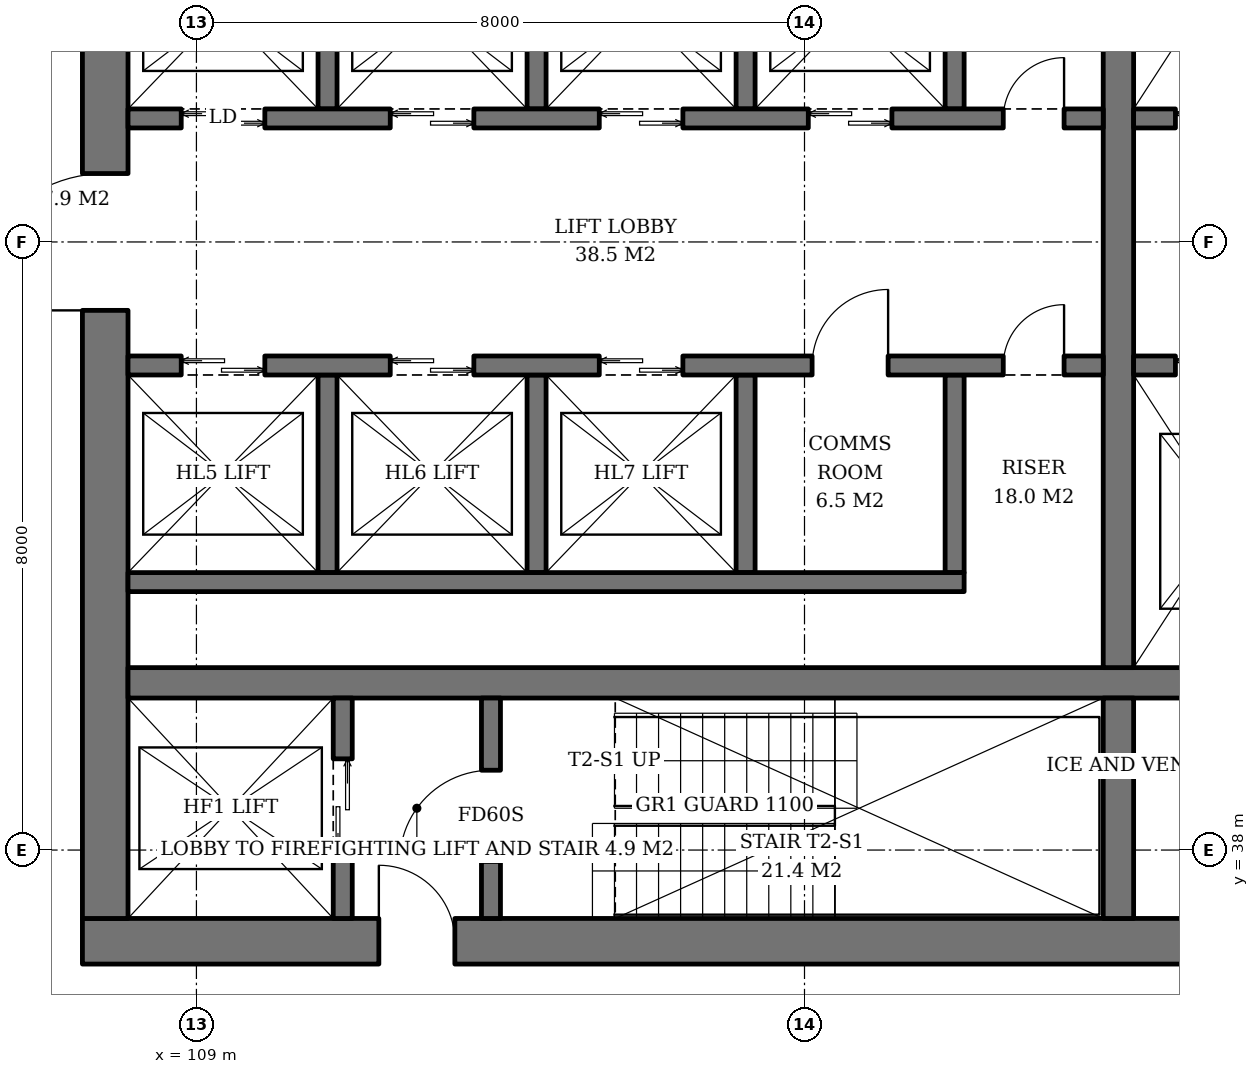
"""IFC4 building model, lengths in metres.
Left out: names, types, materials, properties, quantities, classifications, styles, units other than length and angle.
Written with IfcOpenShell. Run it as: python <this file> out.ifc"""

import sys

from ifc_helpers import new_model, si_unit, direction, frame, frame_2d, origin, place, context, subcontext, project, spatial, rectangle, extrude, element, fill, save


model = new_model("IFC4")
c1 = context("Model", 3, precision=1e-05, world=origin(), true_north=direction((0.0, 1.0)))
c2 = subcontext(c1, "Body", "Model", "MODEL_VIEW")
j1 = project(units=[si_unit("LENGTHUNIT", "METRE"), si_unit("PLANEANGLEUNIT", "RADIAN")], contexts=[c1])
p1 = place(None, origin())
s1 = spatial("IfcSite", under=j1, at=p1, CompositionType="ELEMENT")
p2 = place(p1, origin())
s2 = spatial("IfcBuilding", under=s1, at=p2, CompositionType="ELEMENT")
p3 = place(p2, frame((0.0, 0.0, 127.4)))
s3 = spatial("IfcBuildingStorey", under=s2, at=p3, CompositionType="ELEMENT", Elevation=127.4)
p4 = place(p3, frame((107.5, 36.8, 0.0), z_axis=(0.0, 0.0, 1.0), x_axis=(1.0, 0.0, 0.0)))
e1 = element("IfcWall", 1, at=p4, inside=s3, PredefinedType="SHEAR", context=c2, shape_type="SweptSolid", body=[
    extrude(rectangle(XDim=19.0, YDim=0.6, at=frame_2d((9.5, 0.0))), origin(), (0.0, 0.0, 1.0), 3.8),
])
p5 = place(p4, frame((3.9, 0.0, 0.0)))
e2 = element("IfcOpeningElement", 2, at=p5, cuts=e1, PredefinedType="OPENING", context=c2, shape_type="SweptSolid", body=[
    extrude(rectangle(XDim=1.0, YDim=2.1, at=frame_2d((0.5, 1.05))), frame((0.0, 0.31, 0.0), z_axis=(0.0, -1.0, 0.0), x_axis=(1.0, 0.0, 0.0)), (0.0, 0.0, 1.0), 0.62),
])
p6 = place(p4, frame((14.472, 0.0, 0.0)))
e3 = element("IfcOpeningElement", 3, at=p6, cuts=e1, PredefinedType="OPENING", context=c2, shape_type="SweptSolid", body=[
    extrude(rectangle(XDim=1.0, YDim=2.1, at=frame_2d((0.5, 1.05))), frame((0.0, 0.31, 0.0), z_axis=(0.0, -1.0, 0.0), x_axis=(1.0, 0.0, 0.0)), (0.0, 0.0, 1.0), 0.62),
])
p7 = place(p4, frame((16.365, 0.0, 0.0)))
e4 = element("IfcOpeningElement", 4, at=p7, cuts=e1, PredefinedType="OPENING", context=c2, shape_type="SweptSolid", body=[
    extrude(rectangle(XDim=1.0, YDim=2.1, at=frame_2d((0.5, 1.05))), frame((0.0, 0.31, 0.0), z_axis=(0.0, -1.0, 0.0), x_axis=(1.0, 0.0, 0.0)), (0.0, 0.0, 1.0), 0.62),
])
p8 = place(p3, frame((107.8, 37.1, 0.0), z_axis=(0.0, 0.0, 1.0), x_axis=(0.0, 1.0, 0.0)))
e5 = element("IfcWall", 5, at=p8, inside=s3, PredefinedType="SHEAR", context=c2, shape_type="SweptSolid", body=[
    extrude(rectangle(XDim=17.8, YDim=0.6, at=frame_2d((8.9, 0.0))), origin(), (0.0, 0.0, 1.0), 3.8),
])
p9 = place(p8, frame((8.0, 0.0, 0.0)))
e6 = element("IfcOpeningElement", 6, at=p9, cuts=e5, PredefinedType="OPENING", context=c2, shape_type="SweptSolid", body=[
    extrude(rectangle(XDim=1.8, YDim=2.4, at=frame_2d((0.9, 1.2))), frame((0.0, 0.31, 0.0), z_axis=(0.0, -1.0, 0.0), x_axis=(1.0, 0.0, 0.0)), (0.0, 0.0, 1.0), 0.62),
])
p10 = place(p3, frame((108.1, 40.2, 0.0), z_axis=(0.0, 0.0, 1.0), x_axis=(1.0, 0.0, 0.0)))
e7 = element("IfcWall", 7, at=p10, inside=s3, PredefinedType="SHEAR", context=c2, shape_type="SweptSolid", body=[
    extrude(rectangle(XDim=17.8, YDim=0.4, at=frame_2d((8.9, 0.0))), origin(), (0.0, 0.0, 1.0), 3.8),
])
p11 = place(p3, frame((121.13, 37.1, 0.0), z_axis=(0.0, 0.0, 1.0), x_axis=(0.0, 1.0, 0.0)))
e8 = element("IfcWall", 8, at=p11, inside=s3, PredefinedType="SHEAR", context=c2, shape_type="SweptSolid", body=[
    extrude(rectangle(XDim=2.9, YDim=0.4, at=frame_2d((1.45, 0.0))), origin(), (0.0, 0.0, 1.0), 3.8),
])
p12 = place(p3, frame((121.13, 40.4, 0.0), z_axis=(0.0, 0.0, 1.0), x_axis=(0.0, 1.0, 0.0)))
e9 = element("IfcWall", 9, at=p12, inside=s3, PredefinedType="SHEAR", context=c2, shape_type="SweptSolid", body=[
    extrude(rectangle(XDim=11.2, YDim=0.4, at=frame_2d((5.6, 0.0))), origin(), (0.0, 0.0, 1.0), 3.8),
])
p13 = place(p3, frame((110.925, 37.1, 0.0), z_axis=(0.0, 0.0, 1.0), x_axis=(0.0, 1.0, 0.0)))
e10 = element("IfcWall", 10, at=p13, inside=s3, PredefinedType="SHEAR", context=c2, shape_type="SweptSolid", body=[
    extrude(rectangle(XDim=2.9, YDim=0.25, at=frame_2d((1.45, 0.0))), origin(), (0.0, 0.0, 1.0), 3.8),
])
p14 = place(p13, frame((0.8, 0.0, 0.0)))
e11 = element("IfcOpeningElement", 11, at=p14, cuts=e10, PredefinedType="OPENING", context=c2, shape_type="SweptSolid", body=[
    extrude(rectangle(XDim=1.3, YDim=2.2, at=frame_2d((0.65, 1.1))), frame((0.0, 0.135, 0.0), z_axis=(0.0, -1.0, 0.0), x_axis=(1.0, 0.0, 0.0)), (0.0, 0.0, 1.0), 0.27),
])
p15 = place(p3, frame((112.875, 37.1, 0.0), z_axis=(0.0, 0.0, 1.0), x_axis=(0.0, 1.0, 0.0)))
e12 = element("IfcWall", 12, at=p15, inside=s3, PredefinedType="SHEAR", context=c2, shape_type="SweptSolid", body=[
    extrude(rectangle(XDim=2.9, YDim=0.25, at=frame_2d((1.45, 0.0))), origin(), (0.0, 0.0, 1.0), 3.8),
])
p16 = place(p15, frame((0.75, 0.0, 0.0)))
e13 = element("IfcOpeningElement", 13, at=p16, cuts=e12, PredefinedType="OPENING", context=c2, shape_type="SweptSolid", body=[
    extrude(rectangle(XDim=1.2, YDim=2.1, at=frame_2d((0.6, 1.05))), frame((0.0, 0.135, 0.0), z_axis=(0.0, -1.0, 0.0), x_axis=(1.0, 0.0, 0.0)), (0.0, 0.0, 1.0), 0.27),
])
for number, where, z_axis, x_axis in (
    (14, (110.725, 47.75, 0.0), (0.0, 0.0, 1.0), (0.0, 1.0, 0.0)),
    (15, (113.475, 47.75, 0.0), (0.0, 0.0, 1.0), (0.0, 1.0, 0.0)),
    (16, (116.225, 47.75, 0.0), (0.0, 0.0, 1.0), (0.0, 1.0, 0.0)),
    (17, (118.975, 47.75, 0.0), (0.0, 0.0, 1.0), (0.0, 1.0, 0.0)),
):
    element("IfcWall", number, at=place(p3, frame(where, z_axis=z_axis, x_axis=x_axis)), inside=s3, PredefinedType="SHEAR", context=c2, shape_type="SweptSolid", body=[
        extrude(rectangle(XDim=2.6, YDim=0.25, at=frame_2d((1.3, 0.0))), origin(), (0.0, 0.0, 1.0), 3.8),
    ])
p17 = place(p3, frame((108.1, 47.625, 0.0), z_axis=(0.0, 0.0, 1.0), x_axis=(1.0, 0.0, 0.0)))
e18 = element("IfcWall", 18, at=p17, inside=s3, PredefinedType="SHEAR", context=c2, shape_type="SweptSolid", body=[
    extrude(rectangle(XDim=12.83, YDim=0.25, at=frame_2d((6.415, 0.0))), origin(), (0.0, 0.0, 1.0), 3.8),
])
p18 = place(p17, frame((0.7, 0.0, 0.0)))
e19 = element("IfcOpeningElement", 19, at=p18, cuts=e18, PredefinedType="OPENING", context=c2, shape_type="SweptSolid", body=[
    extrude(rectangle(XDim=1.1, YDim=2.2, at=frame_2d((0.55, 1.1))), frame((0.0, 0.135, 0.0), z_axis=(0.0, -1.0, 0.0), x_axis=(1.0, 0.0, 0.0)), (0.0, 0.0, 1.0), 0.27),
])
p19 = place(p17, frame((3.45, 0.0, 0.0)))
e20 = element("IfcOpeningElement", 20, at=p19, cuts=e18, PredefinedType="OPENING", context=c2, shape_type="SweptSolid", body=[
    extrude(rectangle(XDim=1.1, YDim=2.2, at=frame_2d((0.55, 1.1))), frame((0.0, 0.135, 0.0), z_axis=(0.0, -1.0, 0.0), x_axis=(1.0, 0.0, 0.0)), (0.0, 0.0, 1.0), 0.27),
])
p20 = place(p17, frame((6.2, 0.0, 0.0)))
e21 = element("IfcOpeningElement", 21, at=p20, cuts=e18, PredefinedType="OPENING", context=c2, shape_type="SweptSolid", body=[
    extrude(rectangle(XDim=1.1, YDim=2.2, at=frame_2d((0.55, 1.1))), frame((0.0, 0.135, 0.0), z_axis=(0.0, -1.0, 0.0), x_axis=(1.0, 0.0, 0.0)), (0.0, 0.0, 1.0), 0.27),
])
p21 = place(p17, frame((8.95, 0.0, 0.0)))
e22 = element("IfcOpeningElement", 22, at=p21, cuts=e18, PredefinedType="OPENING", context=c2, shape_type="SweptSolid", body=[
    extrude(rectangle(XDim=1.1, YDim=2.2, at=frame_2d((0.55, 1.1))), frame((0.0, 0.135, 0.0), z_axis=(0.0, -1.0, 0.0), x_axis=(1.0, 0.0, 0.0)), (0.0, 0.0, 1.0), 0.27),
])
p22 = place(p17, frame((11.515, 0.0, 0.0)))
e23 = element("IfcOpeningElement", 23, at=p22, cuts=e18, PredefinedType="OPENING", context=c2, shape_type="SweptSolid", body=[
    extrude(rectangle(XDim=0.8, YDim=2.0, at=frame_2d((0.4, 1.0))), frame((0.0, 0.135, 0.0), z_axis=(0.0, -1.0, 0.0), x_axis=(1.0, 0.0, 0.0)), (0.0, 0.0, 1.0), 0.27),
])
for number, where, z_axis, x_axis in (
    (24, (110.725, 44.25, 0.0), (0.0, 0.0, 1.0), (0.0, -1.0, 0.0)),
    (25, (113.475, 44.25, 0.0), (0.0, 0.0, 1.0), (0.0, -1.0, 0.0)),
    (26, (116.225, 44.25, 0.0), (0.0, 0.0, 1.0), (0.0, -1.0, 0.0)),
    (27, (118.975, 44.25, 0.0), (0.0, 0.0, 1.0), (0.0, -1.0, 0.0)),
):
    element("IfcWall", number, at=place(p3, frame(where, z_axis=z_axis, x_axis=x_axis)), inside=s3, PredefinedType="SHEAR", context=c2, shape_type="SweptSolid", body=[
        extrude(rectangle(XDim=2.6, YDim=0.25, at=frame_2d((1.3, 0.0))), origin(), (0.0, 0.0, 1.0), 3.8),
    ])
p23 = place(p3, frame((108.1, 41.525, 0.0), z_axis=(0.0, 0.0, 1.0), x_axis=(1.0, 0.0, 0.0)))
e28 = element("IfcWall", 28, at=p23, inside=s3, PredefinedType="SHEAR", context=c2, shape_type="SweptSolid", body=[
    extrude(rectangle(XDim=11.0, YDim=0.25, at=frame_2d((5.5, 0.0))), origin(), (0.0, 0.0, 1.0), 3.8),
])
p24 = place(p3, frame((108.1, 44.375, 0.0), z_axis=(0.0, 0.0, 1.0), x_axis=(1.0, 0.0, 0.0)))
e29 = element("IfcWall", 29, at=p24, inside=s3, PredefinedType="SHEAR", context=c2, shape_type="SweptSolid", body=[
    extrude(rectangle(XDim=12.83, YDim=0.25, at=frame_2d((6.415, 0.0))), origin(), (0.0, 0.0, 1.0), 3.8),
])
p25 = place(p24, frame((0.7, 0.0, 0.0)))
e30 = element("IfcOpeningElement", 30, at=p25, cuts=e29, PredefinedType="OPENING", context=c2, shape_type="SweptSolid", body=[
    extrude(rectangle(XDim=1.1, YDim=2.2, at=frame_2d((0.55, 1.1))), frame((0.0, 0.135, 0.0), z_axis=(0.0, -1.0, 0.0), x_axis=(1.0, 0.0, 0.0)), (0.0, 0.0, 1.0), 0.27),
])
p26 = place(p24, frame((3.45, 0.0, 0.0)))
e31 = element("IfcOpeningElement", 31, at=p26, cuts=e29, PredefinedType="OPENING", context=c2, shape_type="SweptSolid", body=[
    extrude(rectangle(XDim=1.1, YDim=2.2, at=frame_2d((0.55, 1.1))), frame((0.0, 0.135, 0.0), z_axis=(0.0, -1.0, 0.0), x_axis=(1.0, 0.0, 0.0)), (0.0, 0.0, 1.0), 0.27),
])
p27 = place(p24, frame((6.2, 0.0, 0.0)))
e32 = element("IfcOpeningElement", 32, at=p27, cuts=e29, PredefinedType="OPENING", context=c2, shape_type="SweptSolid", body=[
    extrude(rectangle(XDim=1.1, YDim=2.2, at=frame_2d((0.55, 1.1))), frame((0.0, 0.135, 0.0), z_axis=(0.0, -1.0, 0.0), x_axis=(1.0, 0.0, 0.0)), (0.0, 0.0, 1.0), 0.27),
])
p28 = place(p24, frame((9.0, 0.0, 0.0)))
e33 = element("IfcOpeningElement", 33, at=p28, cuts=e29, PredefinedType="OPENING", context=c2, shape_type="SweptSolid", body=[
    extrude(rectangle(XDim=1.0, YDim=2.1, at=frame_2d((0.5, 1.05))), frame((0.0, 0.135, 0.0), z_axis=(0.0, -1.0, 0.0), x_axis=(1.0, 0.0, 0.0)), (0.0, 0.0, 1.0), 0.27),
])
p29 = place(p24, frame((11.515, 0.0, 0.0)))
e34 = element("IfcOpeningElement", 34, at=p29, cuts=e29, PredefinedType="OPENING", context=c2, shape_type="SweptSolid", body=[
    extrude(rectangle(XDim=0.8, YDim=2.0, at=frame_2d((0.4, 1.0))), frame((0.0, 0.135, 0.0), z_axis=(0.0, -1.0, 0.0), x_axis=(1.0, 0.0, 0.0)), (0.0, 0.0, 1.0), 0.27),
])
p30 = place(p3, frame((121.33, 47.625, 0.0), z_axis=(0.0, 0.0, 1.0), x_axis=(1.0, 0.0, 0.0)))
e35 = element("IfcWall", 35, at=p30, inside=s3, PredefinedType="SHEAR", context=c2, shape_type="SweptSolid", body=[
    extrude(rectangle(XDim=4.57, YDim=0.25, at=frame_2d((2.285, 0.0))), origin(), (0.0, 0.0, 1.0), 3.8),
])
p31 = place(p30, frame((0.55, 0.0, 0.0)))
e36 = element("IfcOpeningElement", 36, at=p31, cuts=e35, PredefinedType="OPENING", context=c2, shape_type="SweptSolid", body=[
    extrude(rectangle(XDim=1.4, YDim=2.4, at=frame_2d((0.7, 1.2))), frame((0.0, 0.135, 0.0), z_axis=(0.0, -1.0, 0.0), x_axis=(1.0, 0.0, 0.0)), (0.0, 0.0, 1.0), 0.27),
])
p32 = place(p30, frame((3.26, 0.0, 0.0)))
e37 = element("IfcOpeningElement", 37, at=p32, cuts=e35, PredefinedType="OPENING", context=c2, shape_type="SweptSolid", body=[
    extrude(rectangle(XDim=0.8, YDim=2.0, at=frame_2d((0.4, 1.0))), frame((0.0, 0.135, 0.0), z_axis=(0.0, -1.0, 0.0), x_axis=(1.0, 0.0, 0.0)), (0.0, 0.0, 1.0), 0.27),
])
p33 = place(p3, frame((121.33, 44.375, 0.0), z_axis=(0.0, 0.0, 1.0), x_axis=(1.0, 0.0, 0.0)))
e38 = element("IfcWall", 38, at=p33, inside=s3, PredefinedType="SHEAR", context=c2, shape_type="SweptSolid", body=[
    extrude(rectangle(XDim=4.57, YDim=0.25, at=frame_2d((2.285, 0.0))), origin(), (0.0, 0.0, 1.0), 3.8),
])
p34 = place(p33, frame((0.55, 0.0, 0.0)))
e39 = element("IfcOpeningElement", 39, at=p34, cuts=e38, PredefinedType="OPENING", context=c2, shape_type="SweptSolid", body=[
    extrude(rectangle(XDim=1.4, YDim=2.4, at=frame_2d((0.7, 1.2))), frame((0.0, 0.135, 0.0), z_axis=(0.0, -1.0, 0.0), x_axis=(1.0, 0.0, 0.0)), (0.0, 0.0, 1.0), 0.27),
])
p35 = place(p33, frame((3.26, 0.0, 0.0)))
e40 = element("IfcOpeningElement", 40, at=p35, cuts=e38, PredefinedType="OPENING", context=c2, shape_type="SweptSolid", body=[
    extrude(rectangle(XDim=0.8, YDim=2.0, at=frame_2d((0.4, 1.0))), frame((0.0, 0.135, 0.0), z_axis=(0.0, -1.0, 0.0), x_axis=(1.0, 0.0, 0.0)), (0.0, 0.0, 1.0), 0.27),
])
p36 = place(p14, origin())
e41 = element("IfcDoor", 41, at=p36, inside=s3, OperationType="DOUBLE_DOOR_SLIDING", PredefinedType="DOOR", context=c2, shape_type="SweptSolid", body=[
    extrude(rectangle(XDim=1.3, YDim=2.2, at=frame_2d((0.65, 1.1))), frame((0.0, 0.025, 0.0), z_axis=(0.0, -1.0, 0.0), x_axis=(1.0, 0.0, 0.0)), (0.0, 0.0, 1.0), 0.05),
])
fill(e11, e41)
p37 = place(p16, origin())
e42 = element("IfcDoor", 42, at=p37, inside=s3, OperationType="SINGLE_SWING_LEFT", PredefinedType="DOOR", context=c2, shape_type="SweptSolid", body=[
    extrude(rectangle(XDim=1.2, YDim=2.1, at=frame_2d((0.6, 1.05))), frame((0.0, 0.025, 0.0), z_axis=(0.0, -1.0, 0.0), x_axis=(1.0, 0.0, 0.0)), (0.0, 0.0, 1.0), 0.05),
])
fill(e13, e42)
p38 = place(p18, origin())
e43 = element("IfcDoor", 43, at=p38, inside=s3, OperationType="DOUBLE_DOOR_SLIDING", PredefinedType="DOOR", context=c2, shape_type="SweptSolid", body=[
    extrude(rectangle(XDim=1.1, YDim=2.2, at=frame_2d((0.55, 1.1))), frame((0.0, 0.025, 0.0), z_axis=(0.0, -1.0, 0.0), x_axis=(1.0, 0.0, 0.0)), (0.0, 0.0, 1.0), 0.05),
])
fill(e19, e43)
p39 = place(p19, origin())
e44 = element("IfcDoor", 44, at=p39, inside=s3, OperationType="DOUBLE_DOOR_SLIDING", PredefinedType="DOOR", context=c2, shape_type="SweptSolid", body=[
    extrude(rectangle(XDim=1.1, YDim=2.2, at=frame_2d((0.55, 1.1))), frame((0.0, 0.025, 0.0), z_axis=(0.0, -1.0, 0.0), x_axis=(1.0, 0.0, 0.0)), (0.0, 0.0, 1.0), 0.05),
])
fill(e20, e44)
p40 = place(p20, origin())
e45 = element("IfcDoor", 45, at=p40, inside=s3, OperationType="DOUBLE_DOOR_SLIDING", PredefinedType="DOOR", context=c2, shape_type="SweptSolid", body=[
    extrude(rectangle(XDim=1.1, YDim=2.2, at=frame_2d((0.55, 1.1))), frame((0.0, 0.025, 0.0), z_axis=(0.0, -1.0, 0.0), x_axis=(1.0, 0.0, 0.0)), (0.0, 0.0, 1.0), 0.05),
])
fill(e21, e45)
p41 = place(p21, origin())
e46 = element("IfcDoor", 46, at=p41, inside=s3, OperationType="DOUBLE_DOOR_SLIDING", PredefinedType="DOOR", context=c2, shape_type="SweptSolid", body=[
    extrude(rectangle(XDim=1.1, YDim=2.2, at=frame_2d((0.55, 1.1))), frame((0.0, 0.025, 0.0), z_axis=(0.0, -1.0, 0.0), x_axis=(1.0, 0.0, 0.0)), (0.0, 0.0, 1.0), 0.05),
])
fill(e22, e46)
p42 = place(p22, origin())
e47 = element("IfcDoor", 47, at=p42, inside=s3, OperationType="SINGLE_SWING_RIGHT", PredefinedType="DOOR", context=c2, shape_type="SweptSolid", body=[
    extrude(rectangle(XDim=0.8, YDim=2.0, at=frame_2d((0.4, 1.0))), frame((0.0, 0.025, 0.0), z_axis=(0.0, -1.0, 0.0), x_axis=(1.0, 0.0, 0.0)), (0.0, 0.0, 1.0), 0.05),
])
fill(e23, e47)
p43 = place(p25, origin())
e48 = element("IfcDoor", 48, at=p43, inside=s3, OperationType="DOUBLE_DOOR_SLIDING", PredefinedType="DOOR", context=c2, shape_type="SweptSolid", body=[
    extrude(rectangle(XDim=1.1, YDim=2.2, at=frame_2d((0.55, 1.1))), frame((0.0, 0.025, 0.0), z_axis=(0.0, -1.0, 0.0), x_axis=(1.0, 0.0, 0.0)), (0.0, 0.0, 1.0), 0.05),
])
fill(e30, e48)
p44 = place(p26, origin())
e49 = element("IfcDoor", 49, at=p44, inside=s3, OperationType="DOUBLE_DOOR_SLIDING", PredefinedType="DOOR", context=c2, shape_type="SweptSolid", body=[
    extrude(rectangle(XDim=1.1, YDim=2.2, at=frame_2d((0.55, 1.1))), frame((0.0, 0.025, 0.0), z_axis=(0.0, -1.0, 0.0), x_axis=(1.0, 0.0, 0.0)), (0.0, 0.0, 1.0), 0.05),
])
fill(e31, e49)
p45 = place(p27, origin())
e50 = element("IfcDoor", 50, at=p45, inside=s3, OperationType="DOUBLE_DOOR_SLIDING", PredefinedType="DOOR", context=c2, shape_type="SweptSolid", body=[
    extrude(rectangle(XDim=1.1, YDim=2.2, at=frame_2d((0.55, 1.1))), frame((0.0, 0.025, 0.0), z_axis=(0.0, -1.0, 0.0), x_axis=(1.0, 0.0, 0.0)), (0.0, 0.0, 1.0), 0.05),
])
fill(e32, e50)
p46 = place(p28, origin())
e51 = element("IfcDoor", 51, at=p46, inside=s3, OperationType="SINGLE_SWING_RIGHT", PredefinedType="DOOR", context=c2, shape_type="SweptSolid", body=[
    extrude(rectangle(XDim=1.0, YDim=2.1, at=frame_2d((0.5, 1.05))), frame((0.0, 0.025, 0.0), z_axis=(0.0, -1.0, 0.0), x_axis=(1.0, 0.0, 0.0)), (0.0, 0.0, 1.0), 0.05),
])
fill(e33, e51)
p47 = place(p29, origin())
e52 = element("IfcDoor", 52, at=p47, inside=s3, OperationType="SINGLE_SWING_RIGHT", PredefinedType="DOOR", context=c2, shape_type="SweptSolid", body=[
    extrude(rectangle(XDim=0.8, YDim=2.0, at=frame_2d((0.4, 1.0))), frame((0.0, 0.025, 0.0), z_axis=(0.0, -1.0, 0.0), x_axis=(1.0, 0.0, 0.0)), (0.0, 0.0, 1.0), 0.05),
])
fill(e34, e52)
p48 = place(p31, origin())
e53 = element("IfcDoor", 53, at=p48, inside=s3, OperationType="DOUBLE_DOOR_SLIDING", PredefinedType="DOOR", context=c2, shape_type="SweptSolid", body=[
    extrude(rectangle(XDim=1.4, YDim=2.4, at=frame_2d((0.7, 1.2))), frame((0.0, 0.025, 0.0), z_axis=(0.0, -1.0, 0.0), x_axis=(1.0, 0.0, 0.0)), (0.0, 0.0, 1.0), 0.05),
])
fill(e36, e53)
p49 = place(p34, origin())
e54 = element("IfcDoor", 54, at=p49, inside=s3, OperationType="DOUBLE_DOOR_SLIDING", PredefinedType="DOOR", context=c2, shape_type="SweptSolid", body=[
    extrude(rectangle(XDim=1.4, YDim=2.4, at=frame_2d((0.7, 1.2))), frame((0.0, 0.025, 0.0), z_axis=(0.0, -1.0, 0.0), x_axis=(1.0, 0.0, 0.0)), (0.0, 0.0, 1.0), 0.05),
])
fill(e39, e54)
p50 = place(p5, origin())
e55 = element("IfcDoor", 55, at=p50, inside=s3, OperationType="SINGLE_SWING_LEFT", PredefinedType="DOOR", context=c2, shape_type="SweptSolid", body=[
    extrude(rectangle(XDim=1.0, YDim=2.1, at=frame_2d((0.5, 1.05))), frame((0.0, 0.025, 0.0), z_axis=(0.0, -1.0, 0.0), x_axis=(1.0, 0.0, 0.0)), (0.0, 0.0, 1.0), 0.05),
])
fill(e2, e55)
p51 = place(p9, origin())
e56 = element("IfcDoor", 56, at=p51, inside=s3, OperationType="DOUBLE_DOOR_SINGLE_SWING", PredefinedType="DOOR", context=c2, shape_type="SweptSolid", body=[
    extrude(rectangle(XDim=1.8, YDim=2.4, at=frame_2d((0.9, 1.2))), frame((0.0, 0.025, 0.0), z_axis=(0.0, -1.0, 0.0), x_axis=(1.0, 0.0, 0.0)), (0.0, 0.0, 1.0), 0.05),
])
fill(e6, e56)
save(model, sys.argv[1])
